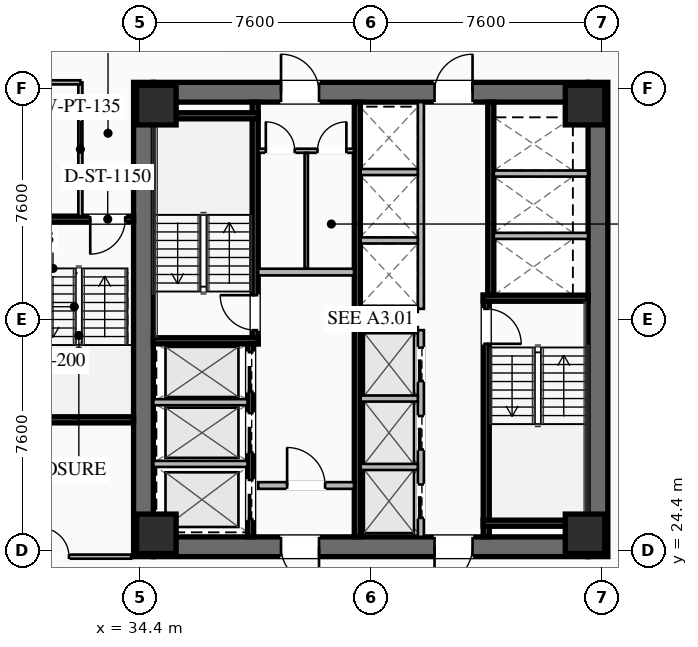
"""IFC4 building model, lengths in metres.
Left out: names, types, materials, properties, quantities, classifications, styles, units other than length and angle.
Written with IfcOpenShell. Run it as: python <this file> out.ifc"""

import sys

from ifc_helpers import new_model, si_unit, direction, frame, frame_2d, origin, origin_2d, place, context, subcontext, project, spatial, rectangle, hollow_rectangle, extrude, element, fill, save


model = new_model("IFC4")
c1 = context("Model", 3, precision=1e-05, world=origin(), true_north=direction((0.0, 1.0)))
c2 = subcontext(c1, "Body", "Model", "MODEL_VIEW")
j1 = project(units=[si_unit("LENGTHUNIT", "METRE"), si_unit("PLANEANGLEUNIT", "RADIAN")], contexts=[c1])
p1 = place(None, origin())
s1 = spatial("IfcSite", under=j1, at=p1, CompositionType="ELEMENT")
p2 = place(p1, origin())
s2 = spatial("IfcBuilding", under=s1, at=p2, CompositionType="ELEMENT")
p3 = place(p2, frame((0.0, 0.0, 53.0)))
s3 = spatial("IfcBuildingStorey", under=s2, at=p3, CompositionType="ELEMENT", Elevation=53.0)
for number, where, z_axis, x_axis in (
    (1, (34.525, 24.2, 0.0), (0.0, 0.0, 1.0), (0.0, 1.0, 0.0)),
    (2, (49.475, 39.8, 0.0), (0.0, 0.0, 1.0), (0.0, -1.0, 0.0)),
):
    element("IfcWall", number, at=place(p3, frame(where, z_axis=z_axis, x_axis=x_axis)), inside=s3, PredefinedType="SHEAR", context=c2, shape_type="SweptSolid", body=[
        extrude(rectangle(XDim=15.6, YDim=0.65, at=frame_2d((7.8, 0.0))), origin(), (0.0, 0.0, 1.0), 3.55),
    ])
p4 = place(p3, frame((49.15, 24.525, 0.0), z_axis=(0.0, 0.0, 1.0), x_axis=(-1.0, 0.0, 0.0)))
e3 = element("IfcWall", 3, at=p4, inside=s3, PredefinedType="SHEAR", context=c2, shape_type="SweptSolid", body=[
    extrude(rectangle(XDim=14.3, YDim=0.65, at=frame_2d((7.15, 0.0))), origin(), (0.0, 0.0, 1.0), 3.55),
])
p5 = place(p4, frame((8.85, 0.0, 0.0)))
e4 = element("IfcOpeningElement", 4, at=p5, cuts=e3, PredefinedType="OPENING", context=c2, shape_type="SweptSolid", body=[
    extrude(rectangle(XDim=1.25, YDim=2.25, at=frame_2d((0.625, 1.125))), frame((0.0, 0.335, 0.0), z_axis=(0.0, -1.0, 0.0), x_axis=(1.0, 0.0, 0.0)), (0.0, 0.0, 1.0), 0.67),
])
p6 = place(p4, frame((3.8, 0.0, 0.0)))
e5 = element("IfcOpeningElement", 5, at=p6, cuts=e3, PredefinedType="OPENING", context=c2, shape_type="SweptSolid", body=[
    extrude(rectangle(XDim=1.25, YDim=2.25, at=frame_2d((0.625, 1.125))), frame((0.0, 0.335, 0.0), z_axis=(0.0, -1.0, 0.0), x_axis=(1.0, 0.0, 0.0)), (0.0, 0.0, 1.0), 0.67),
])
p7 = place(p3, frame((34.85, 39.475, 0.0), z_axis=(0.0, 0.0, 1.0), x_axis=(1.0, 0.0, 0.0)))
e6 = element("IfcWall", 6, at=p7, inside=s3, PredefinedType="SHEAR", context=c2, shape_type="SweptSolid", body=[
    extrude(rectangle(XDim=14.3, YDim=0.65, at=frame_2d((7.15, 0.0))), origin(), (0.0, 0.0, 1.0), 3.55),
])
p8 = place(p7, frame((4.2, 0.0, 0.0)))
e7 = element("IfcOpeningElement", 7, at=p8, cuts=e6, PredefinedType="OPENING", context=c2, shape_type="SweptSolid", body=[
    extrude(rectangle(XDim=1.25, YDim=2.25, at=frame_2d((0.625, 1.125))), frame((0.0, 0.335, 0.0), z_axis=(0.0, -1.0, 0.0), x_axis=(1.0, 0.0, 0.0)), (0.0, 0.0, 1.0), 0.67),
])
p9 = place(p7, frame((9.25, 0.0, 0.0)))
e8 = element("IfcOpeningElement", 8, at=p9, cuts=e6, PredefinedType="OPENING", context=c2, shape_type="SweptSolid", body=[
    extrude(rectangle(XDim=1.25, YDim=2.25, at=frame_2d((0.625, 1.125))), frame((0.0, 0.335, 0.0), z_axis=(0.0, -1.0, 0.0), x_axis=(1.0, 0.0, 0.0)), (0.0, 0.0, 1.0), 0.67),
])
for number, where, z_axis, x_axis in (
    (9, (34.95, 24.95, 0.0), (0.0, 0.0, 1.0), (1.0, 0.0, 0.0)),
    (10, (49.05, 24.95, 0.0), (0.0, 0.0, 1.0), (1.0, 0.0, 0.0)),
    (11, (49.05, 39.05, 0.0), (0.0, 0.0, 1.0), (1.0, 0.0, 0.0)),
    (12, (34.95, 39.05, 0.0), (0.0, 0.0, 1.0), (1.0, 0.0, 0.0)),
):
    element("IfcColumn", number, at=place(p3, frame(where, z_axis=z_axis, x_axis=x_axis)), inside=s3, PredefinedType="COLUMN", context=c2, shape_type="SweptSolid", body=[
        extrude(hollow_rectangle(XDim=1.3, YDim=1.3, WallThickness=0.05, at=origin_2d()), origin(), (0.0, 0.0, 1.0), 3.35),
    ])
p10 = place(p3, frame((38.2, 31.2, 0.0), z_axis=(0.0, 0.0, 1.0), x_axis=(0.0, 1.0, 0.0)))
e13 = element("IfcWall", 13, at=p10, inside=s3, PredefinedType="SHEAR", context=c2, shape_type="SweptSolid", body=[
    extrude(rectangle(XDim=7.95, YDim=0.2, at=frame_2d((3.975, 0.0))), origin(), (0.0, 0.0, 1.0), 3.35),
])
p11 = place(p10, frame((0.45, 0.0, 0.0)))
e14 = element("IfcOpeningElement", 14, at=p11, cuts=e13, PredefinedType="OPENING", context=c2, shape_type="SweptSolid", body=[
    extrude(rectangle(XDim=1.15, YDim=2.2, at=frame_2d((0.575, 1.1))), frame((0.0, 0.11, 0.0), z_axis=(0.0, -1.0, 0.0), x_axis=(1.0, 0.0, 0.0)), (0.0, 0.0, 1.0), 0.22),
])
for number, where, z_axis, x_axis in (
    (15, (34.85, 31.3, 0.0), (0.0, 0.0, 1.0), (1.0, 0.0, 0.0)),
    (16, (34.85, 38.7, 0.0), (0.0, 0.0, 1.0), (1.0, 0.0, 0.0)),
):
    element("IfcWall", number, at=place(p3, frame(where, z_axis=z_axis, x_axis=x_axis)), inside=s3, PredefinedType="SHEAR", context=c2, shape_type="SweptSolid", body=[
        extrude(rectangle(XDim=3.45, YDim=0.2, at=frame_2d((1.725, 0.0))), origin(), (0.0, 0.0, 1.0), 3.35),
    ])
p12 = place(p3, frame((45.8, 32.8, 0.0), z_axis=(0.0, 0.0, 1.0), x_axis=(0.0, -1.0, 0.0)))
e17 = element("IfcWall", 17, at=p12, inside=s3, PredefinedType="SHEAR", context=c2, shape_type="SweptSolid", body=[
    extrude(rectangle(XDim=7.95, YDim=0.2, at=frame_2d((3.975, 0.0))), origin(), (0.0, 0.0, 1.0), 3.35),
])
p13 = place(p12, frame((0.45, 0.0, 0.0)))
e18 = element("IfcOpeningElement", 18, at=p13, cuts=e17, PredefinedType="OPENING", context=c2, shape_type="SweptSolid", body=[
    extrude(rectangle(XDim=1.15, YDim=2.2, at=frame_2d((0.575, 1.1))), frame((0.0, 0.11, 0.0), z_axis=(0.0, -1.0, 0.0), x_axis=(1.0, 0.0, 0.0)), (0.0, 0.0, 1.0), 0.22),
])
for number, where, z_axis, x_axis in (
    (19, (45.7, 32.7, 0.0), (0.0, 0.0, 1.0), (1.0, 0.0, 0.0)),
    (20, (45.7, 25.3, 0.0), (0.0, 0.0, 1.0), (1.0, 0.0, 0.0)),
):
    element("IfcWall", number, at=place(p3, frame(where, z_axis=z_axis, x_axis=x_axis)), inside=s3, PredefinedType="SHEAR", context=c2, shape_type="SweptSolid", body=[
        extrude(rectangle(XDim=3.45, YDim=0.2, at=frame_2d((1.725, 0.0))), origin(), (0.0, 0.0, 1.0), 3.35),
    ])
p14 = place(p3, frame((41.56, 24.85, 0.0), z_axis=(0.0, 0.0, 1.0), x_axis=(0.0, 1.0, 0.0)))
e21 = element("IfcWall", 21, at=p14, inside=s3, PredefinedType="SHEAR", context=c2, shape_type="SweptSolid", body=[
    extrude(rectangle(XDim=14.3, YDim=0.2, at=frame_2d((7.15, 0.0))), origin(), (0.0, 0.0, 1.0), 3.35),
])
p15 = place(p3, frame((38.3, 33.56, 0.0), z_axis=(0.0, 0.0, 1.0), x_axis=(1.0, 0.0, 0.0)))
e22 = element("IfcWall", 22, at=p15, inside=s3, PredefinedType="SOLIDWALL", context=c2, shape_type="SweptSolid", body=[
    extrude(rectangle(XDim=3.15, YDim=0.22, at=frame_2d((1.575, 0.0))), origin(), (0.0, 0.0, 1.0), 2.703),
])
p16 = place(p3, frame((38.3, 26.54, 0.0), z_axis=(0.0, 0.0, 1.0), x_axis=(1.0, 0.0, 0.0)))
e23 = element("IfcWall", 23, at=p16, inside=s3, PredefinedType="SOLIDWALL", context=c2, shape_type="SweptSolid", body=[
    extrude(rectangle(XDim=3.15, YDim=0.22, at=frame_2d((1.575, 0.0))), origin(), (0.0, 0.0, 1.0), 2.703),
])
p17 = place(p16, frame((0.95, 0.0, 0.0)))
e24 = element("IfcOpeningElement", 24, at=p17, cuts=e23, PredefinedType="OPENING", context=c2, shape_type="SweptSolid", body=[
    extrude(rectangle(XDim=1.25, YDim=2.25, at=frame_2d((0.625, 1.125))), frame((0.0, 0.12, 0.0), z_axis=(0.0, -1.0, 0.0), x_axis=(1.0, 0.0, 0.0)), (0.0, 0.0, 1.0), 0.24),
])
p18 = place(p3, frame((38.05, 24.85, 0.0), z_axis=(0.0, 0.0, 1.0), x_axis=(0.0, 1.0, 0.0)))
e25 = element("IfcWall", 25, at=p18, inside=s3, PredefinedType="SHEAR", context=c2, shape_type="SweptSolid", body=[
    extrude(rectangle(XDim=6.35, YDim=0.2, at=frame_2d((3.175, 0.0))), origin(), (0.0, 0.0, 1.0), 3.35),
])
p19 = place(p18, frame((4.775, 0.0, 0.0)))
e26 = element("IfcOpeningElement", 26, at=p19, cuts=e25, PredefinedType="OPENING", context=c2, shape_type="SweptSolid", body=[
    extrude(rectangle(XDim=1.3, YDim=2.25, at=frame_2d((0.65, 1.125))), frame((0.0, 0.11, 0.0), z_axis=(0.0, -1.0, 0.0), x_axis=(1.0, 0.0, 0.0)), (0.0, 0.0, 1.0), 0.22),
])
p20 = place(p18, frame((2.775, 0.0, 0.0)))
e27 = element("IfcOpeningElement", 27, at=p20, cuts=e25, PredefinedType="OPENING", context=c2, shape_type="SweptSolid", body=[
    extrude(rectangle(XDim=1.3, YDim=2.25, at=frame_2d((0.65, 1.125))), frame((0.0, 0.11, 0.0), z_axis=(0.0, -1.0, 0.0), x_axis=(1.0, 0.0, 0.0)), (0.0, 0.0, 1.0), 0.22),
])
p21 = place(p18, frame((0.575, 0.0, 0.0)))
e28 = element("IfcOpeningElement", 28, at=p21, cuts=e25, PredefinedType="OPENING", context=c2, shape_type="SweptSolid", body=[
    extrude(rectangle(XDim=1.3, YDim=2.25, at=frame_2d((0.65, 1.125))), frame((0.0, 0.11, 0.0), z_axis=(0.0, -1.0, 0.0), x_axis=(1.0, 0.0, 0.0)), (0.0, 0.0, 1.0), 0.22),
])
for number, where, z_axis, x_axis in (
    (29, (34.85, 27.25, 0.0), (0.0, 0.0, 1.0), (1.0, 0.0, 0.0)),
    (30, (34.85, 29.28, 0.0), (0.0, 0.0, 1.0), (1.0, 0.0, 0.0)),
):
    element("IfcWall", number, at=place(p3, frame(where, z_axis=z_axis, x_axis=x_axis)), inside=s3, PredefinedType="SOLIDWALL", context=c2, shape_type="SweptSolid", body=[
        extrude(rectangle(XDim=3.1, YDim=0.2, at=frame_2d((1.55, 0.0))), origin(), (0.0, 0.0, 1.0), 3.35),
    ])
p22 = place(p3, frame((45.95, 39.15, 0.0), z_axis=(0.0, 0.0, 1.0), x_axis=(0.0, -1.0, 0.0)))
e31 = element("IfcWall", 31, at=p22, inside=s3, PredefinedType="SHEAR", context=c2, shape_type="SweptSolid", body=[
    extrude(rectangle(XDim=6.35, YDim=0.2, at=frame_2d((3.175, 0.0))), origin(), (0.0, 0.0, 1.0), 3.35),
])
for number, where, z_axis, x_axis in (
    (32, (46.05, 34.75, 0.0), (0.0, 0.0, 1.0), (1.0, 0.0, 0.0)),
    (33, (46.05, 36.8, 0.0), (0.0, 0.0, 1.0), (1.0, 0.0, 0.0)),
):
    element("IfcWall", number, at=place(p3, frame(where, z_axis=z_axis, x_axis=x_axis)), inside=s3, PredefinedType="SOLIDWALL", context=c2, shape_type="SweptSolid", body=[
        extrude(rectangle(XDim=3.1, YDim=0.2, at=frame_2d((1.55, 0.0))), origin(), (0.0, 0.0, 1.0), 3.35),
    ])
p23 = place(p3, frame((38.3, 37.55, 0.0), z_axis=(0.0, 0.0, 1.0), x_axis=(1.0, 0.0, 0.0)))
e34 = element("IfcWall", 34, at=p23, inside=s3, PredefinedType="PARTITIONING", context=c2, shape_type="SweptSolid", body=[
    extrude(rectangle(XDim=3.15, YDim=0.135, at=frame_2d((1.575, 0.0))), origin(), (0.0, 0.0, 1.0), 2.703),
])
p24 = place(p23, frame((0.25, 0.0, 0.0)))
e35 = element("IfcOpeningElement", 35, at=p24, cuts=e34, PredefinedType="OPENING", context=c2, shape_type="SweptSolid", body=[
    extrude(rectangle(XDim=0.95, YDim=2.05, at=frame_2d((0.475, 1.025))), frame((0.0, 0.077, 0.0), z_axis=(0.0, -1.0, 0.0), x_axis=(1.0, 0.0, 0.0)), (0.0, 0.0, 1.0), 0.155),
])
p25 = place(p23, frame((1.95, 0.0, 0.0)))
e36 = element("IfcOpeningElement", 36, at=p25, cuts=e34, PredefinedType="OPENING", context=c2, shape_type="SweptSolid", body=[
    extrude(rectangle(XDim=0.95, YDim=2.05, at=frame_2d((0.475, 1.025))), frame((0.0, 0.077, 0.0), z_axis=(0.0, -1.0, 0.0), x_axis=(1.0, 0.0, 0.0)), (0.0, 0.0, 1.0), 0.155),
])
p26 = place(p3, frame((39.88, 33.68, 0.0), z_axis=(0.0, 0.0, 1.0), x_axis=(0.0, 1.0, 0.0)))
e37 = element("IfcWall", 37, at=p26, inside=s3, PredefinedType="PARTITIONING", context=c2, shape_type="SweptSolid", body=[
    extrude(rectangle(XDim=3.8, YDim=0.11, at=frame_2d((1.9, 0.0))), origin(), (0.0, 0.0, 1.0), 2.703),
])
p27 = place(p3, frame((43.65, 24.85, 0.0), z_axis=(0.0, 0.0, 1.0), x_axis=(0.0, 1.0, 0.0)))
e38 = element("IfcWall", 38, at=p27, inside=s3, PredefinedType="SOLIDWALL", context=c2, shape_type="SweptSolid", body=[
    extrude(rectangle(XDim=6.8, YDim=0.2, at=frame_2d((3.4, 0.0))), origin(), (0.0, 0.0, 1.0), 3.35),
])
p28 = place(p27, frame((0.625, 0.0, 0.0)))
e39 = element("IfcOpeningElement", 39, at=p28, cuts=e38, PredefinedType="OPENING", context=c2, shape_type="SweptSolid", body=[
    extrude(rectangle(XDim=1.1, YDim=2.2, at=frame_2d((0.55, 1.1))), frame((0.0, 0.11, 0.0), z_axis=(0.0, -1.0, 0.0), x_axis=(1.0, 0.0, 0.0)), (0.0, 0.0, 1.0), 0.22),
])
p29 = place(p27, frame((2.875, 0.0, 0.0)))
e40 = element("IfcOpeningElement", 40, at=p29, cuts=e38, PredefinedType="OPENING", context=c2, shape_type="SweptSolid", body=[
    extrude(rectangle(XDim=1.1, YDim=2.2, at=frame_2d((0.55, 1.1))), frame((0.0, 0.11, 0.0), z_axis=(0.0, -1.0, 0.0), x_axis=(1.0, 0.0, 0.0)), (0.0, 0.0, 1.0), 0.22),
])
p30 = place(p27, frame((5.125, 0.0, 0.0)))
e41 = element("IfcOpeningElement", 41, at=p30, cuts=e38, PredefinedType="OPENING", context=c2, shape_type="SweptSolid", body=[
    extrude(rectangle(XDim=1.1, YDim=2.2, at=frame_2d((0.55, 1.1))), frame((0.0, 0.11, 0.0), z_axis=(0.0, -1.0, 0.0), x_axis=(1.0, 0.0, 0.0)), (0.0, 0.0, 1.0), 0.22),
])
for number, where, z_axis, x_axis in (
    (42, (41.67, 27.15, 0.0), (0.0, 0.0, 1.0), (1.0, 0.0, 0.0)),
    (43, (41.67, 29.4, 0.0), (0.0, 0.0, 1.0), (1.0, 0.0, 0.0)),
    (44, (41.67, 31.65, 0.0), (0.0, 0.0, 1.0), (1.0, 0.0, 0.0)),
):
    element("IfcWall", number, at=place(p3, frame(where, z_axis=z_axis, x_axis=x_axis)), inside=s3, PredefinedType="SOLIDWALL", context=c2, shape_type="SweptSolid", body=[
        extrude(rectangle(XDim=1.88, YDim=0.2, at=frame_2d((0.94, 0.0))), origin(), (0.0, 0.0, 1.0), 3.35),
    ])
p31 = place(p3, frame((43.65, 32.35, 0.0), z_axis=(0.0, 0.0, 1.0), x_axis=(0.0, 1.0, 0.0)))
e45 = element("IfcWall", 45, at=p31, inside=s3, PredefinedType="SOLIDWALL", context=c2, shape_type="SweptSolid", body=[
    extrude(rectangle(XDim=6.8, YDim=0.2, at=frame_2d((3.4, 0.0))), origin(), (0.0, 0.0, 1.0), 3.35),
])
for number, where, z_axis, x_axis in (
    (46, (41.67, 32.35, 0.0), (0.0, 0.0, 1.0), (1.0, 0.0, 0.0)),
    (47, (41.67, 34.6, 0.0), (0.0, 0.0, 1.0), (1.0, 0.0, 0.0)),
    (48, (41.67, 36.85, 0.0), (0.0, 0.0, 1.0), (1.0, 0.0, 0.0)),
):
    element("IfcWall", number, at=place(p3, frame(where, z_axis=z_axis, x_axis=x_axis)), inside=s3, PredefinedType="SOLIDWALL", context=c2, shape_type="SweptSolid", body=[
        extrude(rectangle(XDim=1.88, YDim=0.2, at=frame_2d((0.94, 0.0))), origin(), (0.0, 0.0, 1.0), 3.35),
    ])
p32 = place(p3, frame((34.2, 35.3, 0.0), z_axis=(0.0, 0.0, 1.0), x_axis=(-1.0, 0.0, 0.0)))
e49 = element("IfcWall", 49, at=p32, inside=s3, PredefinedType="SHEAR", context=c2, shape_type="SweptSolid", body=[
    extrude(rectangle(XDim=3.4, YDim=0.2, at=frame_2d((1.7, 0.0))), origin(), (0.0, 0.0, 1.0), 3.35),
])
p33 = place(p32, frame((0.275, 0.0, 0.0)))
e50 = element("IfcOpeningElement", 50, at=p33, cuts=e49, PredefinedType="OPENING", context=c2, shape_type="SweptSolid", body=[
    extrude(rectangle(XDim=1.15, YDim=2.2, at=frame_2d((0.575, 1.1))), frame((0.0, 0.11, 0.0), z_axis=(0.0, -1.0, 0.0), x_axis=(1.0, 0.0, 0.0)), (0.0, 0.0, 1.0), 0.22),
])
p34 = place(p3, frame((30.8, 28.7, 0.0), z_axis=(0.0, 0.0, 1.0), x_axis=(1.0, 0.0, 0.0)))
e51 = element("IfcWall", 51, at=p34, inside=s3, PredefinedType="SHEAR", context=c2, shape_type="SweptSolid", body=[
    extrude(rectangle(XDim=3.4, YDim=0.2, at=frame_2d((1.7, 0.0))), origin(), (0.0, 0.0, 1.0), 3.35),
])
p35 = place(p3, frame((32.45, 35.4, 0.0), z_axis=(0.0, 0.0, 1.0), x_axis=(0.0, 1.0, 0.0)))
e52 = element("IfcWall", 52, at=p35, inside=s3, PredefinedType="PARTITIONING", context=c2, shape_type="SweptSolid", body=[
    extrude(rectangle(XDim=4.4, YDim=0.135, at=frame_2d((2.2, 0.0))), origin(), (0.0, 0.0, 1.0), 2.703),
])
p36 = place(p3, frame((32.45, 39.8, 0.0), z_axis=(0.0, 0.0, 1.0), x_axis=(-1.0, 0.0, 0.0)))
e53 = element("IfcWall", 53, at=p36, inside=s3, PredefinedType="PARTITIONING", context=c2, shape_type="SweptSolid", body=[
    extrude(rectangle(XDim=13.33, YDim=0.135, at=frame_2d((6.665, 0.0))), origin(), (0.0, 0.0, 1.0), 2.703),
])
p37 = place(p36, frame((5.84, 0.0, 0.0)))
e54 = element("IfcOpeningElement", 54, at=p37, cuts=e53, PredefinedType="OPENING", context=c2, shape_type="SweptSolid", body=[
    extrude(rectangle(XDim=0.95, YDim=2.05, at=frame_2d((0.475, 1.025))), frame((0.0, 0.077, 0.0), z_axis=(0.0, -1.0, 0.0), x_axis=(1.0, 0.0, 0.0)), (0.0, 0.0, 1.0), 0.155),
])
p38 = place(p3, frame((19.12, 24.2, 0.0), z_axis=(0.0, 0.0, 1.0), x_axis=(1.0, 0.0, 0.0)))
e55 = element("IfcWall", 55, at=p38, inside=s3, PredefinedType="PARTITIONING", context=c2, shape_type="SweptSolid", body=[
    extrude(rectangle(XDim=15.0, YDim=0.135, at=frame_2d((7.5, 0.0))), origin(), (0.0, 0.0, 1.0), 2.703),
])
p39 = place(p38, frame((12.005, 0.0, 0.0)))
e56 = element("IfcOpeningElement", 56, at=p39, cuts=e55, PredefinedType="OPENING", context=c2, shape_type="SweptSolid", body=[
    extrude(rectangle(XDim=0.95, YDim=2.05, at=frame_2d((0.475, 1.025))), frame((0.0, 0.077, 0.0), z_axis=(0.0, -1.0, 0.0), x_axis=(1.0, 0.0, 0.0)), (0.0, 0.0, 1.0), 0.155),
])
p40 = place(p8, origin())
e57 = element("IfcDoor", 57, at=p40, inside=s3, OperationType="SINGLE_SWING_LEFT", PredefinedType="DOOR", context=c2, shape_type="SweptSolid", body=[
    extrude(rectangle(XDim=1.25, YDim=2.25, at=frame_2d((0.625, 1.125))), frame((0.0, 0.025, 0.0), z_axis=(0.0, -1.0, 0.0), x_axis=(1.0, 0.0, 0.0)), (0.0, 0.0, 1.0), 0.05),
])
fill(e7, e57)
p41 = place(p9, origin())
e58 = element("IfcDoor", 58, at=p41, inside=s3, OperationType="SINGLE_SWING_RIGHT", PredefinedType="DOOR", context=c2, shape_type="SweptSolid", body=[
    extrude(rectangle(XDim=1.25, YDim=2.25, at=frame_2d((0.625, 1.125))), frame((0.0, 0.025, 0.0), z_axis=(0.0, -1.0, 0.0), x_axis=(1.0, 0.0, 0.0)), (0.0, 0.0, 1.0), 0.05),
])
fill(e8, e58)
p42 = place(p5, origin())
e59 = element("IfcDoor", 59, at=p42, inside=s3, OperationType="SINGLE_SWING_LEFT", PredefinedType="DOOR", context=c2, shape_type="SweptSolid", body=[
    extrude(rectangle(XDim=1.25, YDim=2.25, at=frame_2d((0.625, 1.125))), frame((0.0, 0.025, 0.0), z_axis=(0.0, -1.0, 0.0), x_axis=(1.0, 0.0, 0.0)), (0.0, 0.0, 1.0), 0.05),
])
fill(e4, e59)
p43 = place(p6, origin())
e60 = element("IfcDoor", 60, at=p43, inside=s3, OperationType="SINGLE_SWING_RIGHT", PredefinedType="DOOR", context=c2, shape_type="SweptSolid", body=[
    extrude(rectangle(XDim=1.25, YDim=2.25, at=frame_2d((0.625, 1.125))), frame((0.0, 0.025, 0.0), z_axis=(0.0, -1.0, 0.0), x_axis=(1.0, 0.0, 0.0)), (0.0, 0.0, 1.0), 0.05),
])
fill(e5, e60)
p44 = place(p11, origin())
e61 = element("IfcDoor", 61, at=p44, inside=s3, OperationType="SINGLE_SWING_RIGHT", PredefinedType="DOOR", context=c2, shape_type="SweptSolid", body=[
    extrude(rectangle(XDim=1.15, YDim=2.2, at=frame_2d((0.575, 1.1))), frame((0.0, 0.025, 0.0), z_axis=(0.0, -1.0, 0.0), x_axis=(1.0, 0.0, 0.0)), (0.0, 0.0, 1.0), 0.05),
])
fill(e14, e61)
p45 = place(p13, origin())
e62 = element("IfcDoor", 62, at=p45, inside=s3, OperationType="SINGLE_SWING_RIGHT", PredefinedType="DOOR", context=c2, shape_type="SweptSolid", body=[
    extrude(rectangle(XDim=1.15, YDim=2.2, at=frame_2d((0.575, 1.1))), frame((0.0, 0.025, 0.0), z_axis=(0.0, -1.0, 0.0), x_axis=(1.0, 0.0, 0.0)), (0.0, 0.0, 1.0), 0.05),
])
fill(e18, e62)
p46 = place(p17, origin())
e63 = element("IfcDoor", 63, at=p46, inside=s3, OperationType="SINGLE_SWING_LEFT", PredefinedType="DOOR", context=c2, shape_type="SweptSolid", body=[
    extrude(rectangle(XDim=1.25, YDim=2.25, at=frame_2d((0.625, 1.125))), frame((0.0, 0.025, 0.0), z_axis=(0.0, -1.0, 0.0), x_axis=(1.0, 0.0, 0.0)), (0.0, 0.0, 1.0), 0.05),
])
fill(e24, e63)
p47 = place(p24, origin())
e64 = element("IfcDoor", 64, at=p47, inside=s3, OperationType="SINGLE_SWING_LEFT", PredefinedType="DOOR", context=c2, shape_type="SweptSolid", body=[
    extrude(rectangle(XDim=0.95, YDim=2.05, at=frame_2d((0.475, 1.025))), frame((0.0, 0.025, 0.0), z_axis=(0.0, -1.0, 0.0), x_axis=(1.0, 0.0, 0.0)), (0.0, 0.0, 1.0), 0.05),
])
fill(e35, e64)
p48 = place(p25, origin())
e65 = element("IfcDoor", 65, at=p48, inside=s3, OperationType="SINGLE_SWING_RIGHT", PredefinedType="DOOR", context=c2, shape_type="SweptSolid", body=[
    extrude(rectangle(XDim=0.95, YDim=2.05, at=frame_2d((0.475, 1.025))), frame((0.0, 0.025, 0.0), z_axis=(0.0, -1.0, 0.0), x_axis=(1.0, 0.0, 0.0)), (0.0, 0.0, 1.0), 0.05),
])
fill(e36, e65)
p49 = place(p33, origin())
e66 = element("IfcDoor", 66, at=p49, inside=s3, OperationType="SINGLE_SWING_RIGHT", PredefinedType="DOOR", context=c2, shape_type="SweptSolid", body=[
    extrude(rectangle(XDim=1.15, YDim=2.2, at=frame_2d((0.575, 1.1))), frame((0.0, 0.025, 0.0), z_axis=(0.0, -1.0, 0.0), x_axis=(1.0, 0.0, 0.0)), (0.0, 0.0, 1.0), 0.05),
])
fill(e50, e66)
p50 = place(p39, origin())
e67 = element("IfcDoor", 67, at=p50, inside=s3, OperationType="SINGLE_SWING_LEFT", PredefinedType="DOOR", context=c2, shape_type="SweptSolid", body=[
    extrude(rectangle(XDim=0.95, YDim=2.05, at=frame_2d((0.475, 1.025))), frame((0.0, 0.025, 0.0), z_axis=(0.0, -1.0, 0.0), x_axis=(1.0, 0.0, 0.0)), (0.0, 0.0, 1.0), 0.05),
])
fill(e56, e67)
p51 = place(p19, origin())
e68 = element("IfcDoor", 68, at=p51, inside=s3, OperationType="SLIDING_TO_LEFT", PredefinedType="DOOR", context=c2, shape_type="SweptSolid", body=[
    extrude(rectangle(XDim=1.3, YDim=2.25, at=frame_2d((0.65, 1.125))), frame((0.0, 0.025, 0.0), z_axis=(0.0, -1.0, 0.0), x_axis=(1.0, 0.0, 0.0)), (0.0, 0.0, 1.0), 0.05),
])
fill(e26, e68)
p52 = place(p20, origin())
e69 = element("IfcDoor", 69, at=p52, inside=s3, OperationType="SLIDING_TO_LEFT", PredefinedType="DOOR", context=c2, shape_type="SweptSolid", body=[
    extrude(rectangle(XDim=1.3, YDim=2.25, at=frame_2d((0.65, 1.125))), frame((0.0, 0.025, 0.0), z_axis=(0.0, -1.0, 0.0), x_axis=(1.0, 0.0, 0.0)), (0.0, 0.0, 1.0), 0.05),
])
fill(e27, e69)
p53 = place(p21, origin())
e70 = element("IfcDoor", 70, at=p53, inside=s3, OperationType="SLIDING_TO_LEFT", PredefinedType="DOOR", context=c2, shape_type="SweptSolid", body=[
    extrude(rectangle(XDim=1.3, YDim=2.25, at=frame_2d((0.65, 1.125))), frame((0.0, 0.025, 0.0), z_axis=(0.0, -1.0, 0.0), x_axis=(1.0, 0.0, 0.0)), (0.0, 0.0, 1.0), 0.05),
])
fill(e28, e70)
p54 = place(p28, origin())
e71 = element("IfcDoor", 71, at=p54, inside=s3, OperationType="SLIDING_TO_LEFT", PredefinedType="DOOR", context=c2, shape_type="SweptSolid", body=[
    extrude(rectangle(XDim=1.1, YDim=2.2, at=frame_2d((0.55, 1.1))), frame((0.0, 0.025, 0.0), z_axis=(0.0, -1.0, 0.0), x_axis=(1.0, 0.0, 0.0)), (0.0, 0.0, 1.0), 0.05),
])
fill(e39, e71)
p55 = place(p29, origin())
e72 = element("IfcDoor", 72, at=p55, inside=s3, OperationType="SLIDING_TO_LEFT", PredefinedType="DOOR", context=c2, shape_type="SweptSolid", body=[
    extrude(rectangle(XDim=1.1, YDim=2.2, at=frame_2d((0.55, 1.1))), frame((0.0, 0.025, 0.0), z_axis=(0.0, -1.0, 0.0), x_axis=(1.0, 0.0, 0.0)), (0.0, 0.0, 1.0), 0.05),
])
fill(e40, e72)
p56 = place(p30, origin())
e73 = element("IfcDoor", 73, at=p56, inside=s3, OperationType="SLIDING_TO_LEFT", PredefinedType="DOOR", context=c2, shape_type="SweptSolid", body=[
    extrude(rectangle(XDim=1.1, YDim=2.2, at=frame_2d((0.55, 1.1))), frame((0.0, 0.025, 0.0), z_axis=(0.0, -1.0, 0.0), x_axis=(1.0, 0.0, 0.0)), (0.0, 0.0, 1.0), 0.05),
])
fill(e41, e73)
save(model, sys.argv[1])
